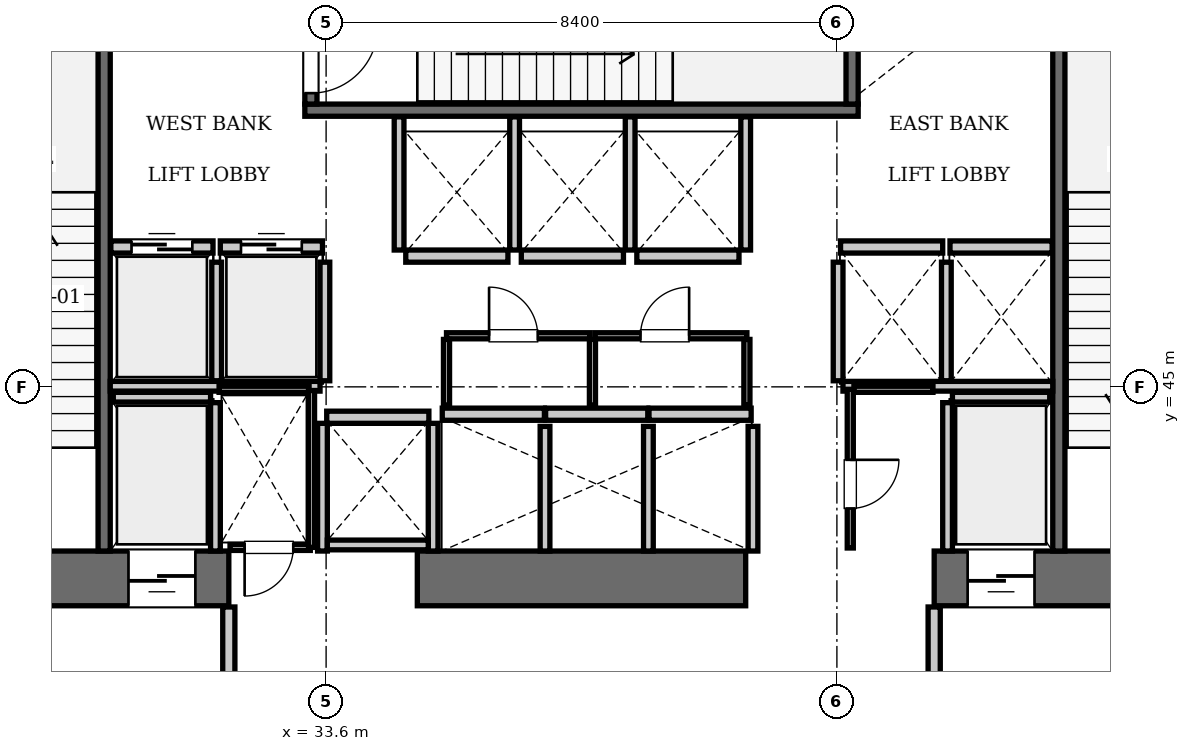
"""IFC4 building model, lengths in metres.
Left out: names, types, materials, properties, quantities, classifications, styles, units other than length and angle.
Written with IfcOpenShell. Run it as: python <this file> out.ifc"""

import sys

from ifc_helpers import new_model, si_unit, direction, frame, frame_2d, origin, place, context, subcontext, project, spatial, rectangle, extrude, element, fill, save


model = new_model("IFC4")
c1 = context("Model", 3, precision=1e-05, world=origin(), true_north=direction((0.0, 1.0)))
c2 = subcontext(c1, "Body", "Model", "MODEL_VIEW")
j1 = project(units=[si_unit("LENGTHUNIT", "METRE"), si_unit("PLANEANGLEUNIT", "RADIAN")], contexts=[c1])
p1 = place(None, origin())
s1 = spatial("IfcSite", under=j1, at=p1, CompositionType="ELEMENT")
p2 = place(p1, origin())
s2 = spatial("IfcBuilding", under=s1, at=p2, CompositionType="ELEMENT")
p3 = place(p2, frame((0.0, 0.0, 10.85)))
s3 = spatial("IfcBuildingStorey", under=s2, at=p3, CompositionType="ELEMENT", Elevation=10.85)
p4 = place(p3, frame((25.2, 41.85, 0.0), z_axis=(0.0, 0.0, 1.0), x_axis=(1.0, 0.0, 0.0)))
e1 = element("IfcWall", 1, at=p4, inside=s3, PredefinedType="SHEAR", context=c2, shape_type="SweptSolid", body=[
    extrude(rectangle(XDim=6.8, YDim=0.9, at=frame_2d((3.4, 0.0))), origin(), (0.0, 0.0, 1.0), 5.6),
])
p5 = place(p4, frame((1.65, 0.0, 0.0)))
e2 = element("IfcOpeningElement", 2, at=p5, cuts=e1, PredefinedType="OPENING", context=c2, shape_type="SweptSolid", body=[
    extrude(rectangle(XDim=1.15, YDim=2.15, at=frame_2d((0.575, 1.075))), frame((0.0, 0.46, 0.0), z_axis=(0.0, -1.0, 0.0), x_axis=(1.0, 0.0, 0.0)), (0.0, 0.0, 1.0), 0.92),
])
p6 = place(p4, frame((5.15, 0.0, 0.0)))
e3 = element("IfcOpeningElement", 3, at=p6, cuts=e1, PredefinedType="OPENING", context=c2, shape_type="SweptSolid", body=[
    extrude(rectangle(XDim=1.1, YDim=2.2, at=frame_2d((0.55, 1.1))), frame((0.0, 0.46, 0.0), z_axis=(0.0, -1.0, 0.0), x_axis=(1.0, 0.0, 0.0)), (0.0, 0.0, 1.0), 0.92),
])
p7 = place(p3, frame((35.1, 41.85, 0.0), z_axis=(0.0, 0.0, 1.0), x_axis=(1.0, 0.0, 0.0)))
e4 = element("IfcWall", 4, at=p7, inside=s3, PredefinedType="SHEAR", context=c2, shape_type="SweptSolid", body=[
    extrude(rectangle(XDim=5.4, YDim=0.9, at=frame_2d((2.7, 0.0))), origin(), (0.0, 0.0, 1.0), 5.6),
])
p8 = place(p3, frame((43.6, 41.85, 0.0), z_axis=(0.0, 0.0, 1.0), x_axis=(1.0, 0.0, 0.0)))
e5 = element("IfcWall", 5, at=p8, inside=s3, PredefinedType="SHEAR", context=c2, shape_type="SweptSolid", body=[
    extrude(rectangle(XDim=6.8, YDim=0.9, at=frame_2d((3.4, 0.0))), origin(), (0.0, 0.0, 1.0), 5.6),
])
p9 = place(p8, frame((3.9, 0.0, 0.0)))
e6 = element("IfcOpeningElement", 6, at=p9, cuts=e5, PredefinedType="OPENING", context=c2, shape_type="SweptSolid", body=[
    extrude(rectangle(XDim=1.15, YDim=2.15, at=frame_2d((0.575, 1.075))), frame((0.0, 0.46, 0.0), z_axis=(0.0, -1.0, 0.0), x_axis=(1.0, 0.0, 0.0)), (0.0, 0.0, 1.0), 0.92),
])
p10 = place(p8, frame((0.55, 0.0, 0.0)))
e7 = element("IfcOpeningElement", 7, at=p10, cuts=e5, PredefinedType="OPENING", context=c2, shape_type="SweptSolid", body=[
    extrude(rectangle(XDim=1.1, YDim=2.2, at=frame_2d((0.55, 1.1))), frame((0.0, 0.46, 0.0), z_axis=(0.0, -1.0, 0.0), x_axis=(1.0, 0.0, 0.0)), (0.0, 0.0, 1.0), 0.92),
])
p11 = place(p3, frame((29.95, 42.3, 0.0), z_axis=(0.0, 0.0, 1.0), x_axis=(0.0, 1.0, 0.0)))
e8 = element("IfcWall", 8, at=p11, inside=s3, PredefinedType="SOLIDWALL", context=c2, shape_type="SweptSolid", body=[
    extrude(rectangle(XDim=8.85, YDim=0.2, at=frame_2d((4.425, 0.0))), origin(), (0.0, 0.0, 1.0), 5.32),
])
p12 = place(p3, frame((33.25, 49.55, 0.0), z_axis=(0.0, 0.0, 1.0), x_axis=(1.0, 0.0, 0.0)))
e9 = element("IfcWall", 9, at=p12, inside=s3, PredefinedType="SOLIDWALL", context=c2, shape_type="SweptSolid", body=[
    extrude(rectangle(XDim=9.1, YDim=0.2, at=frame_2d((4.55, 0.0))), origin(), (0.0, 0.0, 1.0), 5.32),
])
p13 = place(p3, frame((42.25, 49.65, 0.0), z_axis=(0.0, 0.0, 1.0), x_axis=(0.0, 1.0, 0.0)))
e10 = element("IfcWall", 10, at=p13, inside=s3, PredefinedType="SOLIDWALL", context=c2, shape_type="SweptSolid", body=[
    extrude(rectangle(XDim=3.45, YDim=0.2, at=frame_2d((1.725, 0.0))), origin(), (0.0, 0.0, 1.0), 5.32),
])
p14 = place(p3, frame((33.35, 49.65, 0.0), z_axis=(0.0, 0.0, 1.0), x_axis=(0.0, 1.0, 0.0)))
e11 = element("IfcWall", 11, at=p14, inside=s3, PredefinedType="SOLIDWALL", context=c2, shape_type="SweptSolid", body=[
    extrude(rectangle(XDim=3.45, YDim=0.2, at=frame_2d((1.725, 0.0))), origin(), (0.0, 0.0, 1.0), 5.32),
])
p15 = place(p14, frame((0.18, 0.0, 0.0)))
e12 = element("IfcOpeningElement", 12, at=p15, cuts=e11, PredefinedType="OPENING", context=c2, shape_type="SweptSolid", body=[
    extrude(rectangle(XDim=1.1, YDim=2.15, at=frame_2d((0.55, 1.075))), frame((0.0, 0.11, 0.0), z_axis=(0.0, -1.0, 0.0), x_axis=(1.0, 0.0, 0.0)), (0.0, 0.0, 1.0), 0.22),
])
p16 = place(p3, frame((45.65, 42.3, 0.0), z_axis=(0.0, 0.0, 1.0), x_axis=(0.0, 1.0, 0.0)))
e13 = element("IfcWall", 13, at=p16, inside=s3, PredefinedType="SOLIDWALL", context=c2, shape_type="SweptSolid", body=[
    extrude(rectangle(XDim=8.85, YDim=0.2, at=frame_2d((4.425, 0.0))), origin(), (0.0, 0.0, 1.0), 5.32),
])
p17 = place(p3, frame((30.06, 47.3, 0.0), z_axis=(0.0, 0.0, 1.0), x_axis=(1.0, 0.0, 0.0)))
e14 = element("IfcWall", 14, at=p17, inside=s3, PredefinedType="SOLIDWALL", context=c2, shape_type="SweptSolid", body=[
    extrude(rectangle(XDim=1.68, YDim=0.2, at=frame_2d((0.84, 0.0))), origin(), (0.0, 0.0, 1.0), 5.32),
])
p18 = place(p17, frame((0.34, 0.0, 0.0)))
e15 = element("IfcOpeningElement", 15, at=p18, cuts=e14, PredefinedType="OPENING", context=c2, shape_type="SweptSolid", body=[
    extrude(rectangle(XDim=1.0, YDim=2.15, at=frame_2d((0.5, 1.075))), frame((0.0, 0.11, 0.0), z_axis=(0.0, -1.0, 0.0), x_axis=(1.0, 0.0, 0.0)), (0.0, 0.0, 1.0), 0.22),
])
p19 = place(p3, frame((31.86, 47.3, 0.0), z_axis=(0.0, 0.0, 1.0), x_axis=(1.0, 0.0, 0.0)))
e16 = element("IfcWall", 16, at=p19, inside=s3, PredefinedType="SOLIDWALL", context=c2, shape_type="SweptSolid", body=[
    extrude(rectangle(XDim=1.68, YDim=0.2, at=frame_2d((0.84, 0.0))), origin(), (0.0, 0.0, 1.0), 5.32),
])
p20 = place(p19, frame((0.34, 0.0, 0.0)))
e17 = element("IfcOpeningElement", 17, at=p20, cuts=e16, PredefinedType="OPENING", context=c2, shape_type="SweptSolid", body=[
    extrude(rectangle(XDim=1.0, YDim=2.15, at=frame_2d((0.5, 1.075))), frame((0.0, 0.11, 0.0), z_axis=(0.0, -1.0, 0.0), x_axis=(1.0, 0.0, 0.0)), (0.0, 0.0, 1.0), 0.22),
])
for number, where, z_axis, x_axis in (
    (18, (42.06, 47.3, 0.0), (0.0, 0.0, 1.0), (1.0, 0.0, 0.0)),
    (19, (43.86, 47.3, 0.0), (0.0, 0.0, 1.0), (1.0, 0.0, 0.0)),
    (20, (35.51, 44.55, 0.0), (0.0, 0.0, 1.0), (1.0, 0.0, 0.0)),
    (21, (37.21, 44.55, 0.0), (0.0, 0.0, 1.0), (1.0, 0.0, 0.0)),
):
    element("IfcWall", number, at=place(p3, frame(where, z_axis=z_axis, x_axis=x_axis)), inside=s3, PredefinedType="SOLIDWALL", context=c2, shape_type="SweptSolid", body=[
        extrude(rectangle(XDim=1.68, YDim=0.2, at=frame_2d((0.84, 0.0))), origin(), (0.0, 0.0, 1.0), 5.32),
    ])
for number, where, z_axis, x_axis in (
    (22, (38.91, 44.55, 0.0), (0.0, 0.0, 1.0), (1.0, 0.0, 0.0)),
    (23, (34.91, 47.15, 0.0), (0.0, 0.0, 1.0), (1.0, 0.0, 0.0)),
):
    element("IfcWall", number, at=place(p3, frame(where, z_axis=z_axis, x_axis=x_axis)), inside=s3, PredefinedType="SOLIDWALL", context=c2, shape_type="SweptSolid", body=[
        extrude(rectangle(XDim=1.68, YDim=0.2, at=frame_2d((0.84, 0.0))), origin(), (0.0, 0.0, 1.0), 5.32),
    ])
for number, where, z_axis, x_axis in (
    (24, (36.81, 47.15, 0.0), (0.0, 0.0, 1.0), (1.0, 0.0, 0.0)),
    (25, (38.71, 47.15, 0.0), (0.0, 0.0, 1.0), (1.0, 0.0, 0.0)),
    (26, (33.61, 44.5, 0.0), (0.0, 0.0, 1.0), (1.0, 0.0, 0.0)),
):
    element("IfcWall", number, at=place(p3, frame(where, z_axis=z_axis, x_axis=x_axis)), inside=s3, PredefinedType="SOLIDWALL", context=c2, shape_type="SweptSolid", body=[
        extrude(rectangle(XDim=1.68, YDim=0.2, at=frame_2d((0.84, 0.0))), origin(), (0.0, 0.0, 1.0), 5.32),
    ])
p21 = place(p3, frame((30.1, 44.83, 0.0), z_axis=(0.0, 0.0, 1.0), x_axis=(1.0, 0.0, 0.0)))
e27 = element("IfcWall", 27, at=p21, inside=s3, PredefinedType="SOLIDWALL", context=c2, shape_type="SweptSolid", body=[
    extrude(rectangle(XDim=1.6, YDim=0.16, at=frame_2d((0.8, 0.0))), origin(), (0.0, 0.0, 1.0), 5.32),
])
p22 = place(p3, frame((31.78, 42.3, 0.0), z_axis=(0.0, 0.0, 1.0), x_axis=(0.0, 1.0, 0.0)))
e28 = element("IfcWall", 28, at=p22, inside=s3, PredefinedType="SOLIDWALL", context=c2, shape_type="SweptSolid", body=[
    extrude(rectangle(XDim=2.44, YDim=0.16, at=frame_2d((1.22, 0.0))), origin(), (0.0, 0.0, 1.0), 5.32),
])
p23 = place(p3, frame((43.9, 44.83, 0.0), z_axis=(0.0, 0.0, 1.0), x_axis=(1.0, 0.0, 0.0)))
e29 = element("IfcWall", 29, at=p23, inside=s3, PredefinedType="SOLIDWALL", context=c2, shape_type="SweptSolid", body=[
    extrude(rectangle(XDim=1.6, YDim=0.16, at=frame_2d((0.8, 0.0))), origin(), (0.0, 0.0, 1.0), 5.32),
])
p24 = place(p3, frame((43.82, 42.3, 0.0), z_axis=(0.0, 0.0, 1.0), x_axis=(0.0, 1.0, 0.0)))
e30 = element("IfcWall", 30, at=p24, inside=s3, PredefinedType="SOLIDWALL", context=c2, shape_type="SweptSolid", body=[
    extrude(rectangle(XDim=2.44, YDim=0.16, at=frame_2d((1.22, 0.0))), origin(), (0.0, 0.0, 1.0), 5.32),
])
for number, where, z_axis, x_axis in (
    (31, (31.8, 45.1, 0.0), (0.0, 0.0, 1.0), (0.0, 1.0, 0.0)),
    (32, (33.58, 45.1, 0.0), (0.0, 0.0, 1.0), (0.0, 1.0, 0.0)),
):
    element("IfcWall", number, at=place(p3, frame(where, z_axis=z_axis, x_axis=x_axis)), inside=s3, PredefinedType="SOLIDWALL", context=c2, shape_type="SweptSolid", body=[
        extrude(rectangle(XDim=1.95, YDim=0.16, at=frame_2d((0.975, 0.0))), origin(), (0.0, 0.0, 1.0), 5.32),
    ])
p25 = place(p3, frame((30.05, 45.01, 0.0), z_axis=(0.0, 0.0, 1.0), x_axis=(1.0, 0.0, 0.0)))
e33 = element("IfcWall", 33, at=p25, inside=s3, PredefinedType="SOLIDWALL", context=c2, shape_type="SweptSolid", body=[
    extrude(rectangle(XDim=3.45, YDim=0.16, at=frame_2d((1.725, 0.0))), origin(), (0.0, 0.0, 1.0), 5.32),
])
for number, where, z_axis, x_axis in (
    (34, (42.02, 45.1, 0.0), (0.0, 0.0, 1.0), (0.0, 1.0, 0.0)),
    (35, (43.8, 45.1, 0.0), (0.0, 0.0, 1.0), (0.0, 1.0, 0.0)),
):
    element("IfcWall", number, at=place(p3, frame(where, z_axis=z_axis, x_axis=x_axis)), inside=s3, PredefinedType="SOLIDWALL", context=c2, shape_type="SweptSolid", body=[
        extrude(rectangle(XDim=1.95, YDim=0.16, at=frame_2d((0.975, 0.0))), origin(), (0.0, 0.0, 1.0), 5.32),
    ])
p26 = place(p3, frame((42.1, 45.01, 0.0), z_axis=(0.0, 0.0, 1.0), x_axis=(1.0, 0.0, 0.0)))
e36 = element("IfcWall", 36, at=p26, inside=s3, PredefinedType="SOLIDWALL", context=c2, shape_type="SweptSolid", body=[
    extrude(rectangle(XDim=3.45, YDim=0.16, at=frame_2d((1.725, 0.0))), origin(), (0.0, 0.0, 1.0), 5.32),
])
for number, where, z_axis, x_axis in (
    (37, (37.2, 42.3, 0.0), (0.0, 0.0, 1.0), (0.0, 1.0, 0.0)),
    (38, (38.9, 42.3, 0.0), (0.0, 0.0, 1.0), (0.0, 1.0, 0.0)),
    (39, (40.62, 42.3, 0.0), (0.0, 0.0, 1.0), (0.0, 1.0, 0.0)),
):
    element("IfcWall", number, at=place(p3, frame(where, z_axis=z_axis, x_axis=x_axis)), inside=s3, PredefinedType="SOLIDWALL", context=c2, shape_type="SweptSolid", body=[
        extrude(rectangle(XDim=2.05, YDim=0.16, at=frame_2d((1.025, 0.0))), origin(), (0.0, 0.0, 1.0), 5.32),
    ])
for number, where, z_axis, x_axis in (
    (40, (34.8, 47.25, 0.0), (0.0, 0.0, 1.0), (0.0, 1.0, 0.0)),
    (41, (36.7, 47.25, 0.0), (0.0, 0.0, 1.0), (0.0, 1.0, 0.0)),
    (42, (38.6, 47.25, 0.0), (0.0, 0.0, 1.0), (0.0, 1.0, 0.0)),
    (43, (40.5, 47.25, 0.0), (0.0, 0.0, 1.0), (0.0, 1.0, 0.0)),
):
    element("IfcWall", number, at=place(p3, frame(where, z_axis=z_axis, x_axis=x_axis)), inside=s3, PredefinedType="SOLIDWALL", context=c2, shape_type="SweptSolid", body=[
        extrude(rectangle(XDim=2.19, YDim=0.16, at=frame_2d((1.095, 0.0))), origin(), (0.0, 0.0, 1.0), 5.32),
    ])
for number, where, z_axis, x_axis in (
    (44, (33.54, 42.3, 0.0), (0.0, 0.0, 1.0), (0.0, 1.0, 0.0)),
    (45, (35.36, 42.3, 0.0), (0.0, 0.0, 1.0), (0.0, 1.0, 0.0)),
):
    element("IfcWall", number, at=place(p3, frame(where, z_axis=z_axis, x_axis=x_axis)), inside=s3, PredefinedType="SOLIDWALL", context=c2, shape_type="SweptSolid", body=[
        extrude(rectangle(XDim=2.1, YDim=0.16, at=frame_2d((1.05, 0.0))), origin(), (0.0, 0.0, 1.0), 5.32),
    ])
p27 = place(p3, frame((33.62, 42.4, 0.0), z_axis=(0.0, 0.0, 1.0), x_axis=(1.0, 0.0, 0.0)))
e46 = element("IfcWall", 46, at=p27, inside=s3, PredefinedType="SOLIDWALL", context=c2, shape_type="SweptSolid", body=[
    extrude(rectangle(XDim=1.66, YDim=0.16, at=frame_2d((0.83, 0.0))), origin(), (0.0, 0.0, 1.0), 5.32),
])
for number, where, z_axis, x_axis in (
    (47, (32.0, 38.31, 0.0), (0.0, 0.0, 1.0), (0.0, 1.0, 0.0)),
    (48, (43.6, 38.31, 0.0), (0.0, 0.0, 1.0), (0.0, 1.0, 0.0)),
):
    element("IfcWall", number, at=place(p3, frame(where, z_axis=z_axis, x_axis=x_axis)), inside=s3, PredefinedType="PARTITIONING", context=c2, shape_type="SweptSolid", body=[
        extrude(rectangle(XDim=3.07, YDim=0.2, at=frame_2d((1.535, 0.0))), origin(), (0.0, 0.0, 1.0), 5.32),
    ])
p28 = place(p3, frame((32.02, 42.36, 0.0), z_axis=(0.0, 0.0, 1.0), x_axis=(1.0, 0.0, 0.0)))
e49 = element("IfcWall", 49, at=p28, inside=s3, PredefinedType="PARTITIONING", context=c2, shape_type="SweptSolid", body=[
    extrude(rectangle(XDim=1.32, YDim=0.1, at=frame_2d((0.66, 0.0))), origin(), (0.0, 0.0, 1.0), 5.32),
])
p29 = place(p28, frame((0.24, 0.0, 0.0)))
e50 = element("IfcOpeningElement", 50, at=p29, cuts=e49, PredefinedType="OPENING", context=c2, shape_type="SweptSolid", body=[
    extrude(rectangle(XDim=0.8, YDim=2.05, at=frame_2d((0.4, 1.025))), frame((0.0, 0.06, 0.0), z_axis=(0.0, -1.0, 0.0), x_axis=(1.0, 0.0, 0.0)), (0.0, 0.0, 1.0), 0.12),
])
p30 = place(p3, frame((31.84, 44.96, 0.0), z_axis=(0.0, 0.0, 1.0), x_axis=(1.0, 0.0, 0.0)))
e51 = element("IfcWall", 51, at=p30, inside=s3, PredefinedType="PARTITIONING", context=c2, shape_type="SweptSolid", body=[
    extrude(rectangle(XDim=1.48, YDim=0.1, at=frame_2d((0.74, 0.0))), origin(), (0.0, 0.0, 1.0), 5.32),
])
p31 = place(p3, frame((33.36, 42.36, 0.0), z_axis=(0.0, 0.0, 1.0), x_axis=(0.0, 1.0, 0.0)))
e52 = element("IfcWall", 52, at=p31, inside=s3, PredefinedType="PARTITIONING", context=c2, shape_type="SweptSolid", body=[
    extrude(rectangle(XDim=2.58, YDim=0.1, at=frame_2d((1.29, 0.0))), origin(), (0.0, 0.0, 1.0), 5.32),
])
p32 = place(p3, frame((35.58, 45.84, 0.0), z_axis=(0.0, 0.0, 1.0), x_axis=(1.0, 0.0, 0.0)))
e53 = element("IfcWall", 53, at=p32, inside=s3, PredefinedType="PARTITIONING", context=c2, shape_type="SweptSolid", body=[
    extrude(rectangle(XDim=2.36, YDim=0.1, at=frame_2d((1.18, 0.0))), origin(), (0.0, 0.0, 1.0), 5.32),
])
p33 = place(p32, frame((0.7, 0.0, 0.0)))
e54 = element("IfcOpeningElement", 54, at=p33, cuts=e53, PredefinedType="OPENING", context=c2, shape_type="SweptSolid", body=[
    extrude(rectangle(XDim=0.8, YDim=2.05, at=frame_2d((0.4, 1.025))), frame((0.0, 0.06, 0.0), z_axis=(0.0, -1.0, 0.0), x_axis=(1.0, 0.0, 0.0)), (0.0, 0.0, 1.0), 0.12),
])
p34 = place(p3, frame((38.02, 45.84, 0.0), z_axis=(0.0, 0.0, 1.0), x_axis=(1.0, 0.0, 0.0)))
e55 = element("IfcWall", 55, at=p34, inside=s3, PredefinedType="PARTITIONING", context=c2, shape_type="SweptSolid", body=[
    extrude(rectangle(XDim=2.5, YDim=0.1, at=frame_2d((1.25, 0.0))), origin(), (0.0, 0.0, 1.0), 5.32),
])
p35 = place(p34, frame((0.75, 0.0, 0.0)))
e56 = element("IfcOpeningElement", 56, at=p35, cuts=e55, PredefinedType="OPENING", context=c2, shape_type="SweptSolid", body=[
    extrude(rectangle(XDim=0.8, YDim=2.05, at=frame_2d((0.4, 1.025))), frame((0.0, 0.06, 0.0), z_axis=(0.0, -1.0, 0.0), x_axis=(1.0, 0.0, 0.0)), (0.0, 0.0, 1.0), 0.12),
])
for number, where, z_axis, x_axis in (
    (57, (35.58, 44.7, 0.0), (0.0, 0.0, 1.0), (0.0, 1.0, 0.0)),
    (58, (37.98, 44.7, 0.0), (0.0, 0.0, 1.0), (0.0, 1.0, 0.0)),
    (59, (40.52, 44.7, 0.0), (0.0, 0.0, 1.0), (0.0, 1.0, 0.0)),
):
    element("IfcWall", number, at=place(p3, frame(where, z_axis=z_axis, x_axis=x_axis)), inside=s3, PredefinedType="PARTITIONING", context=c2, shape_type="SweptSolid", body=[
        extrude(rectangle(XDim=1.08, YDim=0.1, at=frame_2d((0.54, 0.0))), origin(), (0.0, 0.0, 1.0), 5.32),
    ])
p36 = place(p3, frame((42.22, 42.35, 0.0), z_axis=(0.0, 0.0, 1.0), x_axis=(0.0, 1.0, 0.0)))
e60 = element("IfcWall", 60, at=p36, inside=s3, PredefinedType="PARTITIONING", context=c2, shape_type="SweptSolid", body=[
    extrude(rectangle(XDim=2.61, YDim=0.1, at=frame_2d((1.305, 0.0))), origin(), (0.0, 0.0, 1.0), 5.32),
])
p37 = place(p36, frame((0.65, 0.0, 0.0)))
e61 = element("IfcOpeningElement", 61, at=p37, cuts=e60, PredefinedType="OPENING", context=c2, shape_type="SweptSolid", body=[
    extrude(rectangle(XDim=0.8, YDim=2.05, at=frame_2d((0.4, 1.025))), frame((0.0, 0.06, 0.0), z_axis=(0.0, -1.0, 0.0), x_axis=(1.0, 0.0, 0.0)), (0.0, 0.0, 1.0), 0.12),
])
p38 = place(p3, frame((42.28, 44.96, 0.0), z_axis=(0.0, 0.0, 1.0), x_axis=(1.0, 0.0, 0.0)))
e62 = element("IfcWall", 62, at=p38, inside=s3, PredefinedType="PARTITIONING", context=c2, shape_type="SweptSolid", body=[
    extrude(rectangle(XDim=1.3, YDim=0.1, at=frame_2d((0.65, 0.0))), origin(), (0.0, 0.0, 1.0), 5.32),
])
p39 = place(p15, frame((1.1, 0.0, 0.0), z_axis=(0.0, 0.0, 1.0), x_axis=(-1.0, 0.0, 0.0)))
e63 = element("IfcDoor", 63, at=p39, inside=s3, OperationType="SINGLE_SWING_LEFT", PredefinedType="DOOR", context=c2, shape_type="SweptSolid", body=[
    extrude(rectangle(XDim=1.1, YDim=2.15, at=frame_2d((0.55, 1.075))), frame((0.0, 0.025, 0.0), z_axis=(0.0, -1.0, 0.0), x_axis=(1.0, 0.0, 0.0)), (0.0, 0.0, 1.0), 0.05),
])
fill(e12, e63)
p40 = place(p18, origin())
e64 = element("IfcDoor", 64, at=p40, inside=s3, OperationType="SLIDING_TO_LEFT", PredefinedType="DOOR", context=c2, shape_type="SweptSolid", body=[
    extrude(rectangle(XDim=1.0, YDim=2.15, at=frame_2d((0.5, 1.075))), frame((0.0, 0.025, 0.0), z_axis=(0.0, -1.0, 0.0), x_axis=(1.0, 0.0, 0.0)), (0.0, 0.0, 1.0), 0.05),
])
fill(e15, e64)
p41 = place(p20, origin())
e65 = element("IfcDoor", 65, at=p41, inside=s3, OperationType="SLIDING_TO_LEFT", PredefinedType="DOOR", context=c2, shape_type="SweptSolid", body=[
    extrude(rectangle(XDim=1.0, YDim=2.15, at=frame_2d((0.5, 1.075))), frame((0.0, 0.025, 0.0), z_axis=(0.0, -1.0, 0.0), x_axis=(1.0, 0.0, 0.0)), (0.0, 0.0, 1.0), 0.05),
])
fill(e17, e65)
p42 = place(p6, frame((1.1, 0.0, 0.0), z_axis=(0.0, 0.0, 1.0), x_axis=(-1.0, 0.0, 0.0)))
e66 = element("IfcDoor", 66, at=p42, inside=s3, OperationType="SLIDING_TO_LEFT", PredefinedType="DOOR", context=c2, shape_type="SweptSolid", body=[
    extrude(rectangle(XDim=1.1, YDim=2.2, at=frame_2d((0.55, 1.1))), frame((0.0, 0.025, 0.0), z_axis=(0.0, -1.0, 0.0), x_axis=(1.0, 0.0, 0.0)), (0.0, 0.0, 1.0), 0.05),
])
fill(e3, e66)
p43 = place(p10, frame((1.1, 0.0, 0.0), z_axis=(0.0, 0.0, 1.0), x_axis=(-1.0, 0.0, 0.0)))
e67 = element("IfcDoor", 67, at=p43, inside=s3, OperationType="SLIDING_TO_LEFT", PredefinedType="DOOR", context=c2, shape_type="SweptSolid", body=[
    extrude(rectangle(XDim=1.1, YDim=2.2, at=frame_2d((0.55, 1.1))), frame((0.0, 0.025, 0.0), z_axis=(0.0, -1.0, 0.0), x_axis=(1.0, 0.0, 0.0)), (0.0, 0.0, 1.0), 0.05),
])
fill(e7, e67)
p44 = place(p29, frame((0.8, 0.0, 0.0), z_axis=(0.0, 0.0, 1.0), x_axis=(-1.0, 0.0, 0.0)))
e68 = element("IfcDoor", 68, at=p44, inside=s3, OperationType="SINGLE_SWING_RIGHT", PredefinedType="DOOR", context=c2, shape_type="SweptSolid", body=[
    extrude(rectangle(XDim=0.8, YDim=2.05, at=frame_2d((0.4, 1.025))), frame((0.0, 0.025, 0.0), z_axis=(0.0, -1.0, 0.0), x_axis=(1.0, 0.0, 0.0)), (0.0, 0.0, 1.0), 0.05),
])
fill(e50, e68)
p45 = place(p33, origin())
e69 = element("IfcDoor", 69, at=p45, inside=s3, OperationType="SINGLE_SWING_LEFT", PredefinedType="DOOR", context=c2, shape_type="SweptSolid", body=[
    extrude(rectangle(XDim=0.8, YDim=2.05, at=frame_2d((0.4, 1.025))), frame((0.0, 0.025, 0.0), z_axis=(0.0, -1.0, 0.0), x_axis=(1.0, 0.0, 0.0)), (0.0, 0.0, 1.0), 0.05),
])
fill(e54, e69)
p46 = place(p35, origin())
e70 = element("IfcDoor", 70, at=p46, inside=s3, OperationType="SINGLE_SWING_RIGHT", PredefinedType="DOOR", context=c2, shape_type="SweptSolid", body=[
    extrude(rectangle(XDim=0.8, YDim=2.05, at=frame_2d((0.4, 1.025))), frame((0.0, 0.025, 0.0), z_axis=(0.0, -1.0, 0.0), x_axis=(1.0, 0.0, 0.0)), (0.0, 0.0, 1.0), 0.05),
])
fill(e56, e70)
p47 = place(p37, frame((0.8, 0.0, 0.0), z_axis=(0.0, 0.0, 1.0), x_axis=(-1.0, 0.0, 0.0)))
e71 = element("IfcDoor", 71, at=p47, inside=s3, OperationType="SINGLE_SWING_LEFT", PredefinedType="DOOR", context=c2, shape_type="SweptSolid", body=[
    extrude(rectangle(XDim=0.8, YDim=2.05, at=frame_2d((0.4, 1.025))), frame((0.0, 0.025, 0.0), z_axis=(0.0, -1.0, 0.0), x_axis=(1.0, 0.0, 0.0)), (0.0, 0.0, 1.0), 0.05),
])
fill(e61, e71)
save(model, sys.argv[1])
